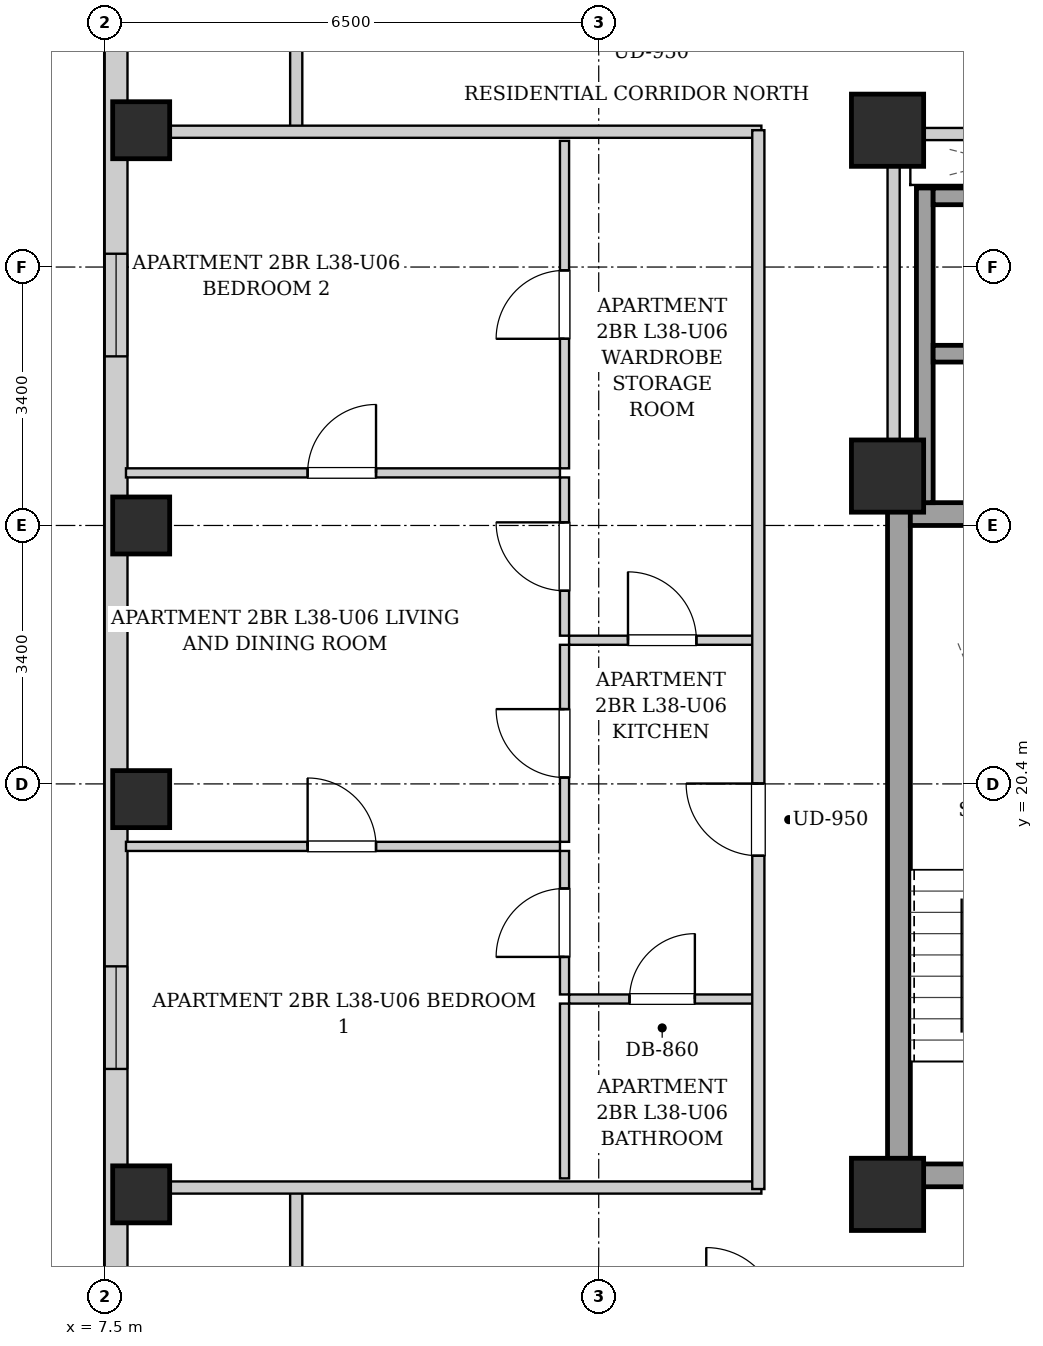
"""IFC4 building model, lengths in metres.
Left out: names, types, materials, properties, quantities, classifications, styles, units other than length and angle.
Written with IfcOpenShell. Run it as: python <this file> out.ifc"""

import sys

from ifc_helpers import new_model, si_unit, direction, frame, frame_2d, origin, origin_2d, place, context, subcontext, project, spatial, rectangle, extrude, element, fill, save


model = new_model("IFC4")
c1 = context("Model", 3, precision=1e-05, world=origin(), true_north=direction((0.0, 1.0)))
c2 = subcontext(c1, "Body", "Model", "MODEL_VIEW")
j1 = project(units=[si_unit("LENGTHUNIT", "METRE"), si_unit("PLANEANGLEUNIT", "RADIAN")], contexts=[c1])
p1 = place(None, origin())
s1 = spatial("IfcSite", under=j1, at=p1, CompositionType="ELEMENT")
p2 = place(p1, origin())
s2 = spatial("IfcBuilding", under=s1, at=p2, CompositionType="ELEMENT")
p3 = place(p2, frame((0.0, 0.0, 134.15)))
s3 = spatial("IfcBuildingStorey", under=s2, at=p3, CompositionType="ELEMENT", Elevation=134.15)
for number, where, z_axis, x_axis in (
    (1, (7.98, 15.0, 0.0), (0.0, 0.0, 1.0), (1.0, 0.0, 0.0)),
    (2, (7.98, 20.2, 0.0), (0.0, 0.0, 1.0), (1.0, 0.0, 0.0)),
    (3, (7.98, 23.8, 0.0), (0.0, 0.0, 1.0), (1.0, 0.0, 0.0)),
    (4, (7.98, 29.0, 0.0), (0.0, 0.0, 1.0), (1.0, 0.0, 0.0)),
):
    element("IfcColumn", number, at=place(p3, frame(where, z_axis=z_axis, x_axis=x_axis)), inside=s3, PredefinedType="COLUMN", context=c2, shape_type="SweptSolid", body=[
        extrude(rectangle(XDim=0.75, YDim=0.75, at=origin_2d()), origin(), (0.0, 0.0, 1.0), 3.25),
    ])
for number, where, z_axis, x_axis in (
    (5, (17.8, 15.0, 0.0), (0.0, 0.0, 1.0), (1.0, 0.0, 0.0)),
    (6, (17.8, 29.0, 0.0), (0.0, 0.0, 1.0), (1.0, 0.0, 0.0)),
    (7, (17.8, 24.45, 0.0), (0.0, 0.0, 1.0), (1.0, 0.0, 0.0)),
):
    element("IfcColumn", number, at=place(p3, frame(where, z_axis=z_axis, x_axis=x_axis)), inside=s3, PredefinedType="COLUMN", context=c2, shape_type="SweptSolid", body=[
        extrude(rectangle(XDim=0.95, YDim=0.95, at=origin_2d()), origin(), (0.0, 0.0, 1.0), 3.25),
    ])
p4 = place(p3, frame((7.65, 6.3, 0.0), z_axis=(0.0, 0.0, 1.0), x_axis=(0.0, 1.0, 0.0)))
e8 = element("IfcWall", 8, at=p4, inside=s3, PredefinedType="SOLIDWALL", context=c2, shape_type="SweptSolid", body=[
    extrude(rectangle(XDim=34.5, YDim=0.3, at=frame_2d((17.25, 0.0))), origin(), (0.0, 0.0, 1.0), 2.99),
])
p5 = place(p4, frame((30.15, 0.0, 0.55)))
e9 = element("IfcOpeningElement", 9, at=p5, cuts=e8, PredefinedType="OPENING", context=c2, shape_type="SweptSolid", body=[
    extrude(rectangle(XDim=1.35, YDim=1.2, at=frame_2d((0.675, 0.6))), frame((0.0, 0.16, 0.0), z_axis=(0.0, -1.0, 0.0), x_axis=(1.0, 0.0, 0.0)), (0.0, 0.0, 1.0), 0.32),
])
p6 = place(p4, frame((28.235, 0.0, 0.55)))
e10 = element("IfcOpeningElement", 10, at=p6, cuts=e8, PredefinedType="OPENING", context=c2, shape_type="SweptSolid", body=[
    extrude(rectangle(XDim=1.35, YDim=1.2, at=frame_2d((0.675, 0.6))), frame((0.0, 0.16, 0.0), z_axis=(0.0, -1.0, 0.0), x_axis=(1.0, 0.0, 0.0)), (0.0, 0.0, 1.0), 0.32),
])
p7 = place(p4, frame((10.35, 0.0, 0.55)))
e11 = element("IfcOpeningElement", 11, at=p7, cuts=e8, PredefinedType="OPENING", context=c2, shape_type="SweptSolid", body=[
    extrude(rectangle(XDim=1.35, YDim=1.2, at=frame_2d((0.675, 0.6))), frame((0.0, 0.16, 0.0), z_axis=(0.0, -1.0, 0.0), x_axis=(1.0, 0.0, 0.0)), (0.0, 0.0, 1.0), 0.32),
])
p8 = place(p4, frame((19.725, 0.0, 0.55)))
e12 = element("IfcOpeningElement", 12, at=p8, cuts=e8, PredefinedType="OPENING", context=c2, shape_type="SweptSolid", body=[
    extrude(rectangle(XDim=1.35, YDim=1.2, at=frame_2d((0.675, 0.6))), frame((0.0, 0.16, 0.0), z_axis=(0.0, -1.0, 0.0), x_axis=(1.0, 0.0, 0.0)), (0.0, 0.0, 1.0), 0.32),
])
p9 = place(p3, frame((17.95, 15.1, 0.0), z_axis=(0.0, 0.0, 1.0), x_axis=(0.0, 1.0, 0.0)))
e13 = element("IfcWall", 13, at=p9, inside=s3, PredefinedType="SHEAR", context=c2, shape_type="SweptSolid", body=[
    extrude(rectangle(XDim=9.0, YDim=0.3, at=frame_2d((4.5, 0.0))), origin(), (0.0, 0.0, 1.0), 2.99),
])
p10 = place(p3, frame((18.1, 23.95, 0.0), z_axis=(0.0, 0.0, 1.0), x_axis=(1.0, 0.0, 0.0)))
e14 = element("IfcWall", 14, at=p10, inside=s3, PredefinedType="SHEAR", context=c2, shape_type="SweptSolid", body=[
    extrude(rectangle(XDim=2.85, YDim=0.3, at=frame_2d((1.425, 0.0))), origin(), (0.0, 0.0, 1.0), 2.99),
])
p11 = place(p3, frame((18.1, 15.25, 0.0), z_axis=(0.0, 0.0, 1.0), x_axis=(1.0, 0.0, 0.0)))
e15 = element("IfcWall", 15, at=p11, inside=s3, PredefinedType="SHEAR", context=c2, shape_type="SweptSolid", body=[
    extrude(rectangle(XDim=2.85, YDim=0.3, at=frame_2d((1.425, 0.0))), origin(), (0.0, 0.0, 1.0), 2.99),
])
p12 = place(p11, frame((0.86, 0.0, 0.0)))
e16 = element("IfcOpeningElement", 16, at=p12, cuts=e15, PredefinedType="OPENING", context=c2, shape_type="SweptSolid", body=[
    extrude(rectangle(XDim=1.1, YDim=2.05, at=frame_2d((0.55, 1.025))), frame((0.0, 0.16, 0.0), z_axis=(0.0, -1.0, 0.0), x_axis=(1.0, 0.0, 0.0)), (0.0, 0.0, 1.0), 0.32),
])
p13 = place(p3, frame((18.29, 24.1, 0.0), z_axis=(0.0, 0.0, 1.0), x_axis=(0.0, 1.0, 0.0)))
e17 = element("IfcWall", 17, at=p13, inside=s3, PredefinedType="SHEAR", context=c2, shape_type="SweptSolid", body=[
    extrude(rectangle(XDim=4.14, YDim=0.22, at=frame_2d((2.07, 0.0))), origin(), (0.0, 0.0, 1.0), 2.99),
])
for number, where, z_axis, x_axis in (
    (18, (18.4, 26.06, 0.0), (0.0, 0.0, 1.0), (1.0, 0.0, 0.0)),
    (19, (18.4, 28.13, 0.0), (0.0, 0.0, 1.0), (1.0, 0.0, 0.0)),
):
    element("IfcWall", number, at=place(p3, frame(where, z_axis=z_axis, x_axis=x_axis)), inside=s3, PredefinedType="SHEAR", context=c2, shape_type="SweptSolid", body=[
        extrude(rectangle(XDim=1.9, YDim=0.22, at=frame_2d((0.95, 0.0))), origin(), (0.0, 0.0, 1.0), 2.99),
    ])
p14 = place(p3, frame((17.88, 24.12, 0.0), z_axis=(0.0, 0.0, 1.0), x_axis=(0.0, 1.0, 0.0)))
e20 = element("IfcWall", 20, at=p14, inside=s3, PredefinedType="PARTITIONING", context=c2, shape_type="SweptSolid", body=[
    extrude(rectangle(XDim=4.76, YDim=0.16, at=frame_2d((2.38, 0.0))), origin(), (0.0, 0.0, 1.0), 2.99),
])
p15 = place(p3, frame((17.96, 28.95, 0.0), z_axis=(0.0, 0.0, 1.0), x_axis=(1.0, 0.0, 0.0)))
e21 = element("IfcWall", 21, at=p15, inside=s3, PredefinedType="PARTITIONING", context=c2, shape_type="SweptSolid", body=[
    extrude(rectangle(XDim=4.29, YDim=0.16, at=frame_2d((2.145, 0.0))), origin(), (0.0, 0.0, 1.0), 2.426),
])
p16 = place(p15, frame((1.695, 0.0, 0.0)))
e22 = element("IfcOpeningElement", 22, at=p16, cuts=e21, PredefinedType="OPENING", context=c2, shape_type="SweptSolid", body=[
    extrude(rectangle(XDim=0.86, YDim=2.05, at=frame_2d((0.43, 1.025))), frame((0.0, 0.09, 0.0), z_axis=(0.0, -1.0, 0.0), x_axis=(1.0, 0.0, 0.0)), (0.0, 0.0, 1.0), 0.18),
])
for number, where, z_axis, x_axis in (
    (23, (10.02, 13.35, 0.0), (0.0, 0.0, 1.0), (0.0, 1.0, 0.0)),
    (24, (10.02, 28.98, 0.0), (0.0, 0.0, 1.0), (0.0, 1.0, 0.0)),
):
    element("IfcWall", number, at=place(p3, frame(where, z_axis=z_axis, x_axis=x_axis)), inside=s3, PredefinedType="PARTITIONING", context=c2, shape_type="SweptSolid", body=[
        extrude(rectangle(XDim=1.74, YDim=0.16, at=frame_2d((0.87, 0.0))), origin(), (0.0, 0.0, 1.0), 2.99),
    ])
for number, where, z_axis, x_axis in (
    (25, (7.78, 15.09, 0.0), (0.0, 0.0, 1.0), (1.0, 0.0, 0.0)),
    (26, (7.78, 28.98, 0.0), (0.0, 0.0, 1.0), (1.0, 0.0, 0.0)),
):
    element("IfcWall", number, at=place(p3, frame(where, z_axis=z_axis, x_axis=x_axis)), inside=s3, PredefinedType="PARTITIONING", context=c2, shape_type="SweptSolid", body=[
        extrude(rectangle(XDim=8.36, YDim=0.16, at=frame_2d((4.18, 0.0))), origin(), (0.0, 0.0, 1.0), 2.426),
    ])
p17 = place(p3, frame((13.61, 22.29, 0.0), z_axis=(0.0, 0.0, 1.0), x_axis=(1.0, 0.0, 0.0)))
e27 = element("IfcWall", 27, at=p17, inside=s3, PredefinedType="PARTITIONING", context=c2, shape_type="SweptSolid", body=[
    extrude(rectangle(XDim=2.45, YDim=0.12, at=frame_2d((1.225, 0.0))), origin(), (0.0, 0.0, 1.0), 2.99),
])
p18 = place(p17, frame((0.775, 0.0, 0.0)))
e28 = element("IfcOpeningElement", 28, at=p18, cuts=e27, PredefinedType="OPENING", context=c2, shape_type="SweptSolid", body=[
    extrude(rectangle(XDim=0.9, YDim=2.05, at=frame_2d((0.45, 1.025))), frame((0.0, 0.07, 0.0), z_axis=(0.0, -1.0, 0.0), x_axis=(1.0, 0.0, 0.0)), (0.0, 0.0, 1.0), 0.14),
])
p19 = place(p3, frame((13.55, 22.35, 0.0), z_axis=(0.0, 0.0, 1.0), x_axis=(0.0, 1.0, 0.0)))
e29 = element("IfcWall", 29, at=p19, inside=s3, PredefinedType="PARTITIONING", context=c2, shape_type="SweptSolid", body=[
    extrude(rectangle(XDim=2.082, YDim=0.12, at=frame_2d((1.041, 0.0))), origin(), (0.0, 0.0, 1.0), 2.99),
])
p20 = place(p19, frame((0.591, 0.0, 0.0)))
e30 = element("IfcOpeningElement", 30, at=p20, cuts=e29, PredefinedType="OPENING", context=c2, shape_type="SweptSolid", body=[
    extrude(rectangle(XDim=0.9, YDim=2.05, at=frame_2d((0.45, 1.025))), frame((0.0, 0.07, 0.0), z_axis=(0.0, -1.0, 0.0), x_axis=(1.0, 0.0, 0.0)), (0.0, 0.0, 1.0), 0.14),
])
p21 = place(p3, frame((13.55, 24.552, 0.0), z_axis=(0.0, 0.0, 1.0), x_axis=(0.0, 1.0, 0.0)))
e31 = element("IfcWall", 31, at=p21, inside=s3, PredefinedType="PARTITIONING", context=c2, shape_type="SweptSolid", body=[
    extrude(rectangle(XDim=4.308, YDim=0.12, at=frame_2d((2.154, 0.0))), origin(), (0.0, 0.0, 1.0), 2.99),
])
p22 = place(p21, frame((1.704, 0.0, 0.0)))
e32 = element("IfcOpeningElement", 32, at=p22, cuts=e31, PredefinedType="OPENING", context=c2, shape_type="SweptSolid", body=[
    extrude(rectangle(XDim=0.9, YDim=2.05, at=frame_2d((0.45, 1.025))), frame((0.0, 0.07, 0.0), z_axis=(0.0, -1.0, 0.0), x_axis=(1.0, 0.0, 0.0)), (0.0, 0.0, 1.0), 0.14),
])
p23 = place(p3, frame((13.61, 17.57, 0.0), z_axis=(0.0, 0.0, 1.0), x_axis=(1.0, 0.0, 0.0)))
e33 = element("IfcWall", 33, at=p23, inside=s3, PredefinedType="PARTITIONING", context=c2, shape_type="SweptSolid", body=[
    extrude(rectangle(XDim=2.45, YDim=0.12, at=frame_2d((1.225, 0.0))), origin(), (0.0, 0.0, 1.0), 2.99),
])
p24 = place(p23, frame((0.795, 0.0, 0.0)))
e34 = element("IfcOpeningElement", 34, at=p24, cuts=e33, PredefinedType="OPENING", context=c2, shape_type="SweptSolid", body=[
    extrude(rectangle(XDim=0.86, YDim=2.05, at=frame_2d((0.43, 1.025))), frame((0.0, 0.07, 0.0), z_axis=(0.0, -1.0, 0.0), x_axis=(1.0, 0.0, 0.0)), (0.0, 0.0, 1.0), 0.14),
])
p25 = place(p3, frame((13.55, 15.21, 0.0), z_axis=(0.0, 0.0, 1.0), x_axis=(0.0, 1.0, 0.0)))
e35 = element("IfcWall", 35, at=p25, inside=s3, PredefinedType="PARTITIONING", context=c2, shape_type="SweptSolid", body=[
    extrude(rectangle(XDim=2.3, YDim=0.12, at=frame_2d((1.15, 0.0))), origin(), (0.0, 0.0, 1.0), 2.99),
])
p26 = place(p3, frame((13.55, 17.63, 0.0), z_axis=(0.0, 0.0, 1.0), x_axis=(0.0, 1.0, 0.0)))
e36 = element("IfcWall", 36, at=p26, inside=s3, PredefinedType="PARTITIONING", context=c2, shape_type="SweptSolid", body=[
    extrude(rectangle(XDim=1.888, YDim=0.12, at=frame_2d((0.944, 0.0))), origin(), (0.0, 0.0, 1.0), 2.99),
])
p27 = place(p26, frame((0.494, 0.0, 0.0)))
e37 = element("IfcOpeningElement", 37, at=p27, cuts=e36, PredefinedType="OPENING", context=c2, shape_type="SweptSolid", body=[
    extrude(rectangle(XDim=0.9, YDim=2.05, at=frame_2d((0.45, 1.025))), frame((0.0, 0.07, 0.0), z_axis=(0.0, -1.0, 0.0), x_axis=(1.0, 0.0, 0.0)), (0.0, 0.0, 1.0), 0.14),
])
p28 = place(p3, frame((13.55, 19.638, 0.0), z_axis=(0.0, 0.0, 1.0), x_axis=(0.0, 1.0, 0.0)))
e38 = element("IfcWall", 38, at=p28, inside=s3, PredefinedType="PARTITIONING", context=c2, shape_type="SweptSolid", body=[
    extrude(rectangle(XDim=2.592, YDim=0.12, at=frame_2d((1.296, 0.0))), origin(), (0.0, 0.0, 1.0), 2.99),
])
p29 = place(p28, frame((0.846, 0.0, 0.0)))
e39 = element("IfcOpeningElement", 39, at=p29, cuts=e38, PredefinedType="OPENING", context=c2, shape_type="SweptSolid", body=[
    extrude(rectangle(XDim=0.9, YDim=2.05, at=frame_2d((0.45, 1.025))), frame((0.0, 0.07, 0.0), z_axis=(0.0, -1.0, 0.0), x_axis=(1.0, 0.0, 0.0)), (0.0, 0.0, 1.0), 0.14),
])
p30 = place(p3, frame((7.78, 19.578, 0.0), z_axis=(0.0, 0.0, 1.0), x_axis=(1.0, 0.0, 0.0)))
e40 = element("IfcWall", 40, at=p30, inside=s3, PredefinedType="PARTITIONING", context=c2, shape_type="SweptSolid", body=[
    extrude(rectangle(XDim=5.71, YDim=0.12, at=frame_2d((2.855, 0.0))), origin(), (0.0, 0.0, 1.0), 2.99),
])
p31 = place(p30, frame((2.39, 0.0, 0.0)))
e41 = element("IfcOpeningElement", 41, at=p31, cuts=e40, PredefinedType="OPENING", context=c2, shape_type="SweptSolid", body=[
    extrude(rectangle(XDim=0.9, YDim=2.05, at=frame_2d((0.45, 1.025))), frame((0.0, 0.07, 0.0), z_axis=(0.0, -1.0, 0.0), x_axis=(1.0, 0.0, 0.0)), (0.0, 0.0, 1.0), 0.14),
])
p32 = place(p3, frame((7.78, 24.492, 0.0), z_axis=(0.0, 0.0, 1.0), x_axis=(1.0, 0.0, 0.0)))
e42 = element("IfcWall", 42, at=p32, inside=s3, PredefinedType="PARTITIONING", context=c2, shape_type="SweptSolid", body=[
    extrude(rectangle(XDim=5.71, YDim=0.12, at=frame_2d((2.855, 0.0))), origin(), (0.0, 0.0, 1.0), 2.621),
])
p33 = place(p32, frame((2.39, 0.0, 0.0)))
e43 = element("IfcOpeningElement", 43, at=p33, cuts=e42, PredefinedType="OPENING", context=c2, shape_type="SweptSolid", body=[
    extrude(rectangle(XDim=0.9, YDim=2.05, at=frame_2d((0.45, 1.025))), frame((0.0, 0.07, 0.0), z_axis=(0.0, -1.0, 0.0), x_axis=(1.0, 0.0, 0.0)), (0.0, 0.0, 1.0), 0.14),
])
p34 = place(p3, frame((16.1, 15.07, 0.0), z_axis=(0.0, 0.0, 1.0), x_axis=(0.0, 1.0, 0.0)))
e44 = element("IfcWall", 44, at=p34, inside=s3, PredefinedType="PARTITIONING", context=c2, shape_type="SweptSolid", body=[
    extrude(rectangle(XDim=13.93, YDim=0.16, at=frame_2d((6.965, 0.0))), origin(), (0.0, 0.0, 1.0), 2.99),
])
p35 = place(p34, frame((4.385, 0.0, 0.0)))
e45 = element("IfcOpeningElement", 45, at=p35, cuts=e44, PredefinedType="OPENING", context=c2, shape_type="SweptSolid", body=[
    extrude(rectangle(XDim=0.95, YDim=2.1, at=frame_2d((0.475, 1.05))), frame((0.0, 0.09, 0.0), z_axis=(0.0, -1.0, 0.0), x_axis=(1.0, 0.0, 0.0)), (0.0, 0.0, 1.0), 0.18),
])
p36 = place(p18, origin())
e46 = element("IfcDoor", 46, at=p36, inside=s3, OperationType="SINGLE_SWING_LEFT", PredefinedType="DOOR", context=c2, shape_type="SweptSolid", body=[
    extrude(rectangle(XDim=0.9, YDim=2.05, at=frame_2d((0.45, 1.025))), frame((0.0, 0.025, 0.0), z_axis=(0.0, -1.0, 0.0), x_axis=(1.0, 0.0, 0.0)), (0.0, 0.0, 1.0), 0.05),
])
fill(e28, e46)
p37 = place(p20, origin())
e47 = element("IfcDoor", 47, at=p37, inside=s3, OperationType="SINGLE_SWING_RIGHT", PredefinedType="DOOR", context=c2, shape_type="SweptSolid", body=[
    extrude(rectangle(XDim=0.9, YDim=2.05, at=frame_2d((0.45, 1.025))), frame((0.0, 0.025, 0.0), z_axis=(0.0, -1.0, 0.0), x_axis=(1.0, 0.0, 0.0)), (0.0, 0.0, 1.0), 0.05),
])
fill(e30, e47)
p38 = place(p22, origin())
e48 = element("IfcDoor", 48, at=p38, inside=s3, OperationType="SINGLE_SWING_LEFT", PredefinedType="DOOR", context=c2, shape_type="SweptSolid", body=[
    extrude(rectangle(XDim=0.9, YDim=2.05, at=frame_2d((0.45, 1.025))), frame((0.0, 0.025, 0.0), z_axis=(0.0, -1.0, 0.0), x_axis=(1.0, 0.0, 0.0)), (0.0, 0.0, 1.0), 0.05),
])
fill(e32, e48)
p39 = place(p24, origin())
e49 = element("IfcDoor", 49, at=p39, inside=s3, OperationType="SINGLE_SWING_RIGHT", PredefinedType="DOOR", context=c2, shape_type="SweptSolid", body=[
    extrude(rectangle(XDim=0.86, YDim=2.05, at=frame_2d((0.43, 1.025))), frame((0.0, 0.025, 0.0), z_axis=(0.0, -1.0, 0.0), x_axis=(1.0, 0.0, 0.0)), (0.0, 0.0, 1.0), 0.05),
])
fill(e34, e49)
p40 = place(p27, origin())
e50 = element("IfcDoor", 50, at=p40, inside=s3, OperationType="SINGLE_SWING_LEFT", PredefinedType="DOOR", context=c2, shape_type="SweptSolid", body=[
    extrude(rectangle(XDim=0.9, YDim=2.05, at=frame_2d((0.45, 1.025))), frame((0.0, 0.025, 0.0), z_axis=(0.0, -1.0, 0.0), x_axis=(1.0, 0.0, 0.0)), (0.0, 0.0, 1.0), 0.05),
])
fill(e37, e50)
p41 = place(p29, origin())
e51 = element("IfcDoor", 51, at=p41, inside=s3, OperationType="SINGLE_SWING_RIGHT", PredefinedType="DOOR", context=c2, shape_type="SweptSolid", body=[
    extrude(rectangle(XDim=0.9, YDim=2.05, at=frame_2d((0.45, 1.025))), frame((0.0, 0.025, 0.0), z_axis=(0.0, -1.0, 0.0), x_axis=(1.0, 0.0, 0.0)), (0.0, 0.0, 1.0), 0.05),
])
fill(e39, e51)
p42 = place(p31, origin())
e52 = element("IfcDoor", 52, at=p42, inside=s3, OperationType="SINGLE_SWING_LEFT", PredefinedType="DOOR", context=c2, shape_type="SweptSolid", body=[
    extrude(rectangle(XDim=0.9, YDim=2.05, at=frame_2d((0.45, 1.025))), frame((0.0, 0.025, 0.0), z_axis=(0.0, -1.0, 0.0), x_axis=(1.0, 0.0, 0.0)), (0.0, 0.0, 1.0), 0.05),
])
fill(e41, e52)
p43 = place(p33, origin())
e53 = element("IfcDoor", 53, at=p43, inside=s3, OperationType="SINGLE_SWING_RIGHT", PredefinedType="DOOR", context=c2, shape_type="SweptSolid", body=[
    extrude(rectangle(XDim=0.9, YDim=2.05, at=frame_2d((0.45, 1.025))), frame((0.0, 0.025, 0.0), z_axis=(0.0, -1.0, 0.0), x_axis=(1.0, 0.0, 0.0)), (0.0, 0.0, 1.0), 0.05),
])
fill(e43, e53)
p44 = place(p35, origin())
e54 = element("IfcDoor", 54, at=p44, inside=s3, OperationType="SINGLE_SWING_RIGHT", PredefinedType="DOOR", context=c2, shape_type="SweptSolid", body=[
    extrude(rectangle(XDim=0.95, YDim=2.1, at=frame_2d((0.475, 1.05))), frame((0.0, 0.025, 0.0), z_axis=(0.0, -1.0, 0.0), x_axis=(1.0, 0.0, 0.0)), (0.0, 0.0, 1.0), 0.05),
])
fill(e45, e54)
p45 = place(p7, origin())
e55 = element("IfcWindow", 55, at=p45, inside=s3, PartitioningType="SINGLE_PANEL", PredefinedType="WINDOW", context=c2, shape_type="SweptSolid", body=[
    extrude(rectangle(XDim=1.35, YDim=1.2, at=frame_2d((0.675, 0.6))), frame((0.0, 0.03, 0.0), z_axis=(0.0, -1.0, 0.0), x_axis=(1.0, 0.0, 0.0)), (0.0, 0.0, 1.0), 0.06),
])
fill(e11, e55)
p46 = place(p8, origin())
e56 = element("IfcWindow", 56, at=p46, inside=s3, PartitioningType="SINGLE_PANEL", PredefinedType="WINDOW", context=c2, shape_type="SweptSolid", body=[
    extrude(rectangle(XDim=1.35, YDim=1.2, at=frame_2d((0.675, 0.6))), frame((0.0, 0.03, 0.0), z_axis=(0.0, -1.0, 0.0), x_axis=(1.0, 0.0, 0.0)), (0.0, 0.0, 1.0), 0.06),
])
fill(e12, e56)
save(model, sys.argv[1])
